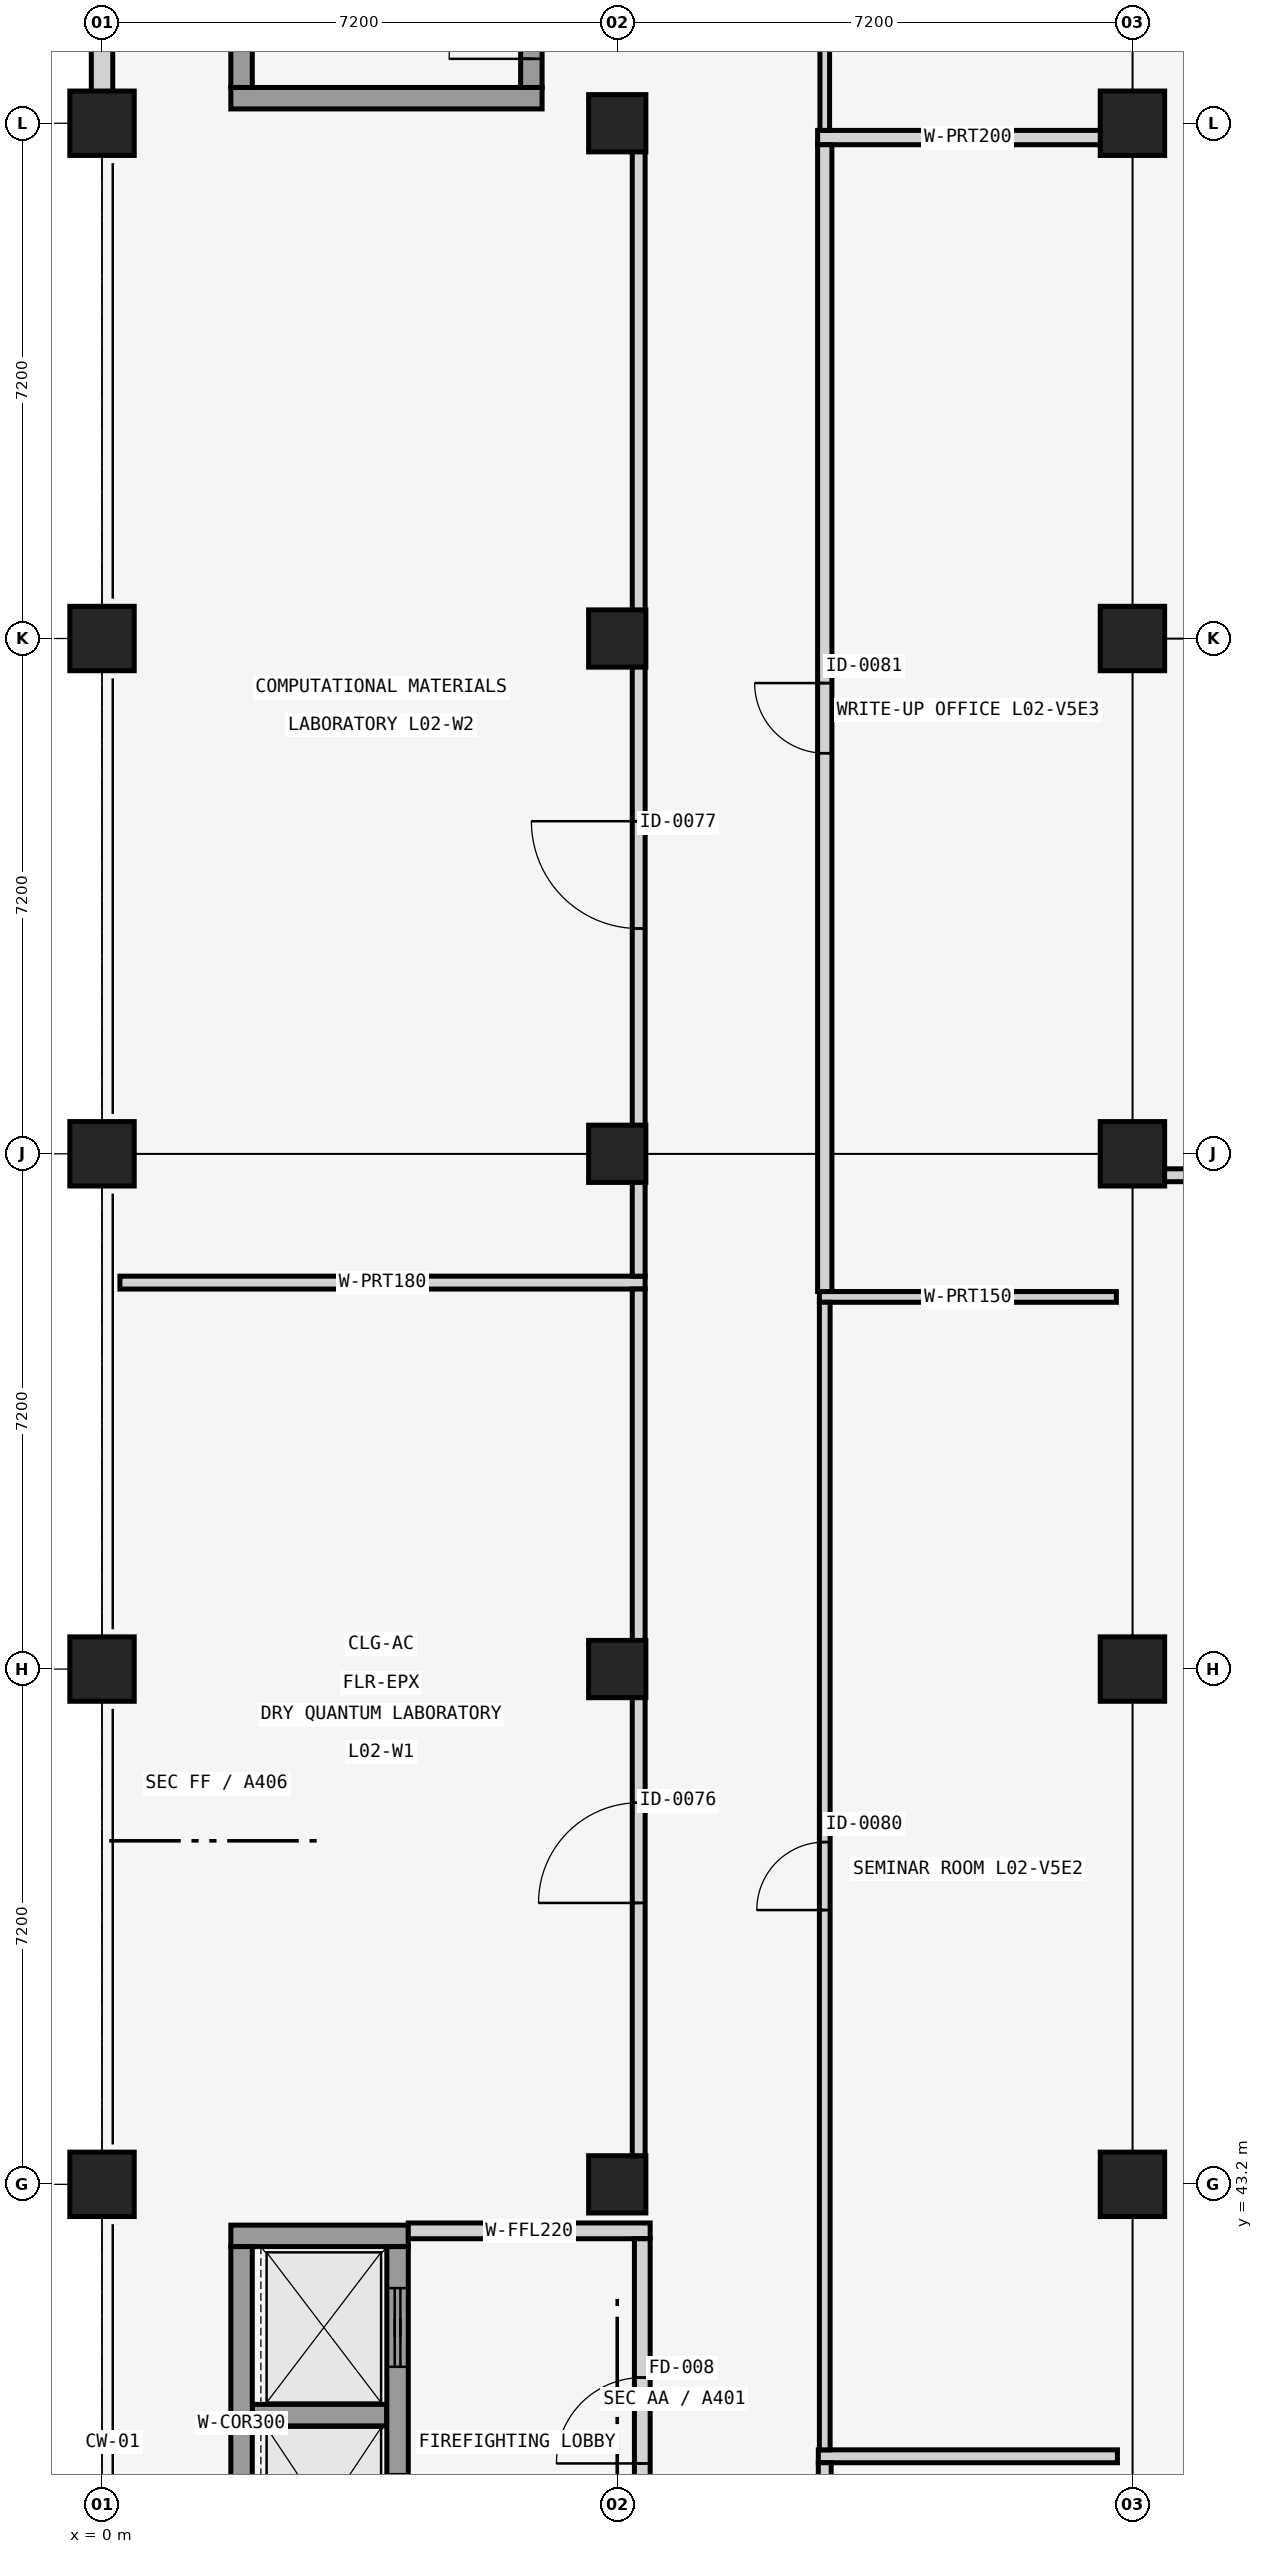
"""IFC4 building model, lengths in metres.
Left out: names, types, materials, properties, quantities, classifications, styles, units other than length and angle.
Written with IfcOpenShell. Run it as: python <this file> out.ifc"""

import sys

from ifc_helpers import new_model, si_unit, direction, frame, frame_2d, origin, origin_2d, place, context, subcontext, project, spatial, rectangle, extrude, element, fill, save


model = new_model("IFC4")
c1 = context("Model", 3, precision=1e-05, world=origin(), true_north=direction((0.0, 1.0)))
c2 = subcontext(c1, "Body", "Model", "MODEL_VIEW")
j1 = project(units=[si_unit("LENGTHUNIT", "METRE"), si_unit("PLANEANGLEUNIT", "RADIAN")], contexts=[c1])
p1 = place(None, origin())
s1 = spatial("IfcSite", under=j1, at=p1, CompositionType="ELEMENT")
p2 = place(p1, origin())
s2 = spatial("IfcBuilding", under=s1, at=p2, CompositionType="ELEMENT")
p3 = place(p2, frame((0.0, 0.0, 8.96)))
s3 = spatial("IfcBuildingStorey", under=s2, at=p3, CompositionType="ELEMENT", Elevation=8.96)
for number, where, z_axis, x_axis in (
    (1, (0.0, 43.2, 0.0), (0.0, 0.0, 1.0), (1.0, 0.0, 0.0)),
    (2, (0.0, 50.4, 0.0), (0.0, 0.0, 1.0), (1.0, 0.0, 0.0)),
    (3, (0.0, 57.6, 0.0), (0.0, 0.0, 1.0), (1.0, 0.0, 0.0)),
    (4, (0.0, 64.8, 0.0), (0.0, 0.0, 1.0), (1.0, 0.0, 0.0)),
    (5, (0.0, 72.0, 0.0), (0.0, 0.0, 1.0), (1.0, 0.0, 0.0)),
):
    element("IfcColumn", number, at=place(p3, frame(where, z_axis=z_axis, x_axis=x_axis)), inside=s3, PredefinedType="COLUMN", context=c2, shape_type="SweptSolid", body=[
        extrude(rectangle(XDim=0.9, YDim=0.9, at=origin_2d()), origin(), (0.0, 0.0, 1.0), 4.16),
    ])
for number, where, z_axis, x_axis in (
    (6, (7.2, 43.2, 0.0), (0.0, 0.0, 1.0), (1.0, 0.0, 0.0)),
    (7, (7.2, 50.4, 0.0), (0.0, 0.0, 1.0), (1.0, 0.0, 0.0)),
    (8, (7.2, 57.6, 0.0), (0.0, 0.0, 1.0), (1.0, 0.0, 0.0)),
    (9, (7.2, 64.8, 0.0), (0.0, 0.0, 1.0), (1.0, 0.0, 0.0)),
    (10, (7.2, 72.0, 0.0), (0.0, 0.0, 1.0), (1.0, 0.0, 0.0)),
):
    element("IfcColumn", number, at=place(p3, frame(where, z_axis=z_axis, x_axis=x_axis)), inside=s3, PredefinedType="COLUMN", context=c2, shape_type="SweptSolid", body=[
        extrude(rectangle(XDim=0.8, YDim=0.8, at=origin_2d()), origin(), (0.0, 0.0, 1.0), 4.16),
    ])
for number, where, z_axis, x_axis in (
    (11, (14.4, 43.2, 0.0), (0.0, 0.0, 1.0), (1.0, 0.0, 0.0)),
    (12, (14.4, 50.4, 0.0), (0.0, 0.0, 1.0), (1.0, 0.0, 0.0)),
    (13, (14.4, 57.6, 0.0), (0.0, 0.0, 1.0), (1.0, 0.0, 0.0)),
    (14, (14.4, 64.8, 0.0), (0.0, 0.0, 1.0), (1.0, 0.0, 0.0)),
    (15, (14.4, 72.0, 0.0), (0.0, 0.0, 1.0), (1.0, 0.0, 0.0)),
):
    element("IfcColumn", number, at=place(p3, frame(where, z_axis=z_axis, x_axis=x_axis)), inside=s3, PredefinedType="COLUMN", context=c2, shape_type="SweptSolid", body=[
        extrude(rectangle(XDim=0.9, YDim=0.9, at=origin_2d()), origin(), (0.0, 0.0, 1.0), 4.16),
    ])
p4 = place(p3, frame((0.0, 72.44, 0.0), z_axis=(0.0, 0.0, 1.0), x_axis=(0.0, 1.0, 0.0)))
e16 = element("IfcWall", 16, at=p4, inside=s3, PredefinedType="SOLIDWALL", context=c2, shape_type="SweptSolid", body=[
    extrude(rectangle(XDim=6.32, YDim=0.3, at=frame_2d((3.16, 0.0))), origin(), (0.0, 0.0, 1.0), 3.21),
])
p5 = place(p4, frame((2.935, 0.0, 0.65)))
e17 = element("IfcOpeningElement", 17, at=p5, cuts=e16, PredefinedType="OPENING", context=c2, shape_type="SweptSolid", body=[
    extrude(rectangle(XDim=0.45, YDim=2.4, at=frame_2d((0.225, 1.2))), frame((0.0, 0.16, 0.0), z_axis=(0.0, -1.0, 0.0), x_axis=(1.0, 0.0, 0.0)), (0.0, 0.0, 1.0), 0.32),
])
p6 = place(p3, frame((1.8, 42.48, 0.0), z_axis=(0.0, 0.0, 1.0), x_axis=(1.0, 0.0, 0.0)))
e18 = element("IfcWall", 18, at=p6, inside=s3, PredefinedType="SHEAR", context=c2, shape_type="SweptSolid", body=[
    extrude(rectangle(XDim=2.48, YDim=0.3, at=frame_2d((1.24, 0.0))), origin(), (0.0, 0.0, 1.0), 3.81),
])
p7 = place(p3, frame((2.1, 39.975, 0.0), z_axis=(0.0, 0.0, 1.0), x_axis=(1.0, 0.0, 0.0)))
e19 = element("IfcWall", 19, at=p7, inside=s3, PredefinedType="SHEAR", context=c2, shape_type="SweptSolid", body=[
    extrude(rectangle(XDim=1.88, YDim=0.3, at=frame_2d((0.94, 0.0))), origin(), (0.0, 0.0, 1.0), 3.81),
])
p8 = place(p3, frame((1.95, 37.4, 0.0), z_axis=(0.0, 0.0, 1.0), x_axis=(0.0, 1.0, 0.0)))
e20 = element("IfcWall", 20, at=p8, inside=s3, PredefinedType="SHEAR", context=c2, shape_type="SweptSolid", body=[
    extrude(rectangle(XDim=4.93, YDim=0.3, at=frame_2d((2.465, 0.0))), origin(), (0.0, 0.0, 1.0), 3.81),
])
p9 = place(p3, frame((4.13, 37.4, 0.0), z_axis=(0.0, 0.0, 1.0), x_axis=(0.0, 1.0, 0.0)))
e21 = element("IfcWall", 21, at=p9, inside=s3, PredefinedType="SHEAR", context=c2, shape_type="SweptSolid", body=[
    extrude(rectangle(XDim=4.93, YDim=0.3, at=frame_2d((2.465, 0.0))), origin(), (0.0, 0.0, 1.0), 3.81),
])
p10 = place(p9, frame((0.65, 0.0, 0.0)))
e22 = element("IfcOpeningElement", 22, at=p10, cuts=e21, PredefinedType="OPENING", context=c2, shape_type="SweptSolid", body=[
    extrude(rectangle(XDim=1.1, YDim=2.2, at=frame_2d((0.55, 1.1))), frame((0.0, 0.16, 0.0), z_axis=(0.0, -1.0, 0.0), x_axis=(1.0, 0.0, 0.0)), (0.0, 0.0, 1.0), 0.32),
])
p11 = place(p9, frame((3.25, 0.0, 0.0)))
e23 = element("IfcOpeningElement", 23, at=p11, cuts=e21, PredefinedType="OPENING", context=c2, shape_type="SweptSolid", body=[
    extrude(rectangle(XDim=1.1, YDim=2.2, at=frame_2d((0.55, 1.1))), frame((0.0, 0.16, 0.0), z_axis=(0.0, -1.0, 0.0), x_axis=(1.0, 0.0, 0.0)), (0.0, 0.0, 1.0), 0.32),
])
p12 = place(p3, frame((4.28, 42.55, 0.0), z_axis=(0.0, 0.0, 1.0), x_axis=(1.0, 0.0, 0.0)))
e24 = element("IfcWall", 24, at=p12, inside=s3, PredefinedType="SOLIDWALL", context=c2, shape_type="SweptSolid", body=[
    extrude(rectangle(XDim=3.38, YDim=0.22, at=frame_2d((1.69, 0.0))), origin(), (0.0, 0.0, 1.0), 2.81),
])
p13 = place(p3, frame((7.55, 37.36, 0.0), z_axis=(0.0, 0.0, 1.0), x_axis=(0.0, 1.0, 0.0)))
e25 = element("IfcWall", 25, at=p13, inside=s3, PredefinedType="SOLIDWALL", context=c2, shape_type="SweptSolid", body=[
    extrude(rectangle(XDim=5.08, YDim=0.22, at=frame_2d((2.54, 0.0))), origin(), (0.0, 0.0, 1.0), 3.51),
])
p14 = place(p13, frame((1.94, 0.0, 0.0)))
e26 = element("IfcOpeningElement", 26, at=p14, cuts=e25, PredefinedType="OPENING", context=c2, shape_type="SweptSolid", body=[
    extrude(rectangle(XDim=1.2, YDim=2.2, at=frame_2d((0.6, 1.1))), frame((0.0, 0.12, 0.0), z_axis=(0.0, -1.0, 0.0), x_axis=(1.0, 0.0, 0.0)), (0.0, 0.0, 1.0), 0.24),
])
p15 = place(p3, frame((1.8, 72.35, 0.0), z_axis=(0.0, 0.0, 1.0), x_axis=(1.0, 0.0, 0.0)))
e27 = element("IfcWall", 27, at=p15, inside=s3, PredefinedType="SHEAR", context=c2, shape_type="SweptSolid", body=[
    extrude(rectangle(XDim=4.35, YDim=0.3, at=frame_2d((2.175, 0.0))), origin(), (0.0, 0.0, 1.0), 3.81),
])
p16 = place(p3, frame((1.95, 72.5, 0.0), z_axis=(0.0, 0.0, 1.0), x_axis=(0.0, 1.0, 0.0)))
e28 = element("IfcWall", 28, at=p16, inside=s3, PredefinedType="SHEAR", context=c2, shape_type="SweptSolid", body=[
    extrude(rectangle(XDim=7.8, YDim=0.3, at=frame_2d((3.9, 0.0))), origin(), (0.0, 0.0, 1.0), 3.81),
])
p17 = place(p3, frame((6.0, 72.5, 0.0), z_axis=(0.0, 0.0, 1.0), x_axis=(0.0, 1.0, 0.0)))
e29 = element("IfcWall", 29, at=p17, inside=s3, PredefinedType="SHEAR", context=c2, shape_type="SweptSolid", body=[
    extrude(rectangle(XDim=7.8, YDim=0.3, at=frame_2d((3.9, 0.0))), origin(), (0.0, 0.0, 1.0), 3.81),
])
p18 = place(p17, frame((0.4, 0.0, 0.0)))
e30 = element("IfcOpeningElement", 30, at=p18, cuts=e29, PredefinedType="OPENING", context=c2, shape_type="SweptSolid", body=[
    extrude(rectangle(XDim=1.15, YDim=2.2, at=frame_2d((0.575, 1.1))), frame((0.0, 0.16, 0.0), z_axis=(0.0, -1.0, 0.0), x_axis=(1.0, 0.0, 0.0)), (0.0, 0.0, 1.0), 0.32),
])
p19 = place(p3, frame((0.25, 55.8, 0.0), z_axis=(0.0, 0.0, 1.0), x_axis=(1.0, 0.0, 0.0)))
e31 = element("IfcWall", 31, at=p19, inside=s3, PredefinedType="PARTITIONING", context=c2, shape_type="SweptSolid", body=[
    extrude(rectangle(XDim=7.34, YDim=0.18, at=frame_2d((3.67, 0.0))), origin(), (0.0, 0.0, 1.0), 2.81),
])
p20 = place(p3, frame((7.5, 43.59, 0.0), z_axis=(0.0, 0.0, 1.0), x_axis=(0.0, 1.0, 0.0)))
e32 = element("IfcWall", 32, at=p20, inside=s3, PredefinedType="PARTITIONING", context=c2, shape_type="SweptSolid", body=[
    extrude(rectangle(XDim=12.12, YDim=0.18, at=frame_2d((6.06, 0.0))), origin(), (0.0, 0.0, 1.0), 3.21),
])
p21 = place(p20, frame((3.542, 0.0, 0.0)))
e33 = element("IfcOpeningElement", 33, at=p21, cuts=e32, PredefinedType="OPENING", context=c2, shape_type="SweptSolid", body=[
    extrude(rectangle(XDim=1.4, YDim=2.2, at=frame_2d((0.7, 1.1))), frame((0.0, 0.1, 0.0), z_axis=(0.0, -1.0, 0.0), x_axis=(1.0, 0.0, 0.0)), (0.0, 0.0, 1.0), 0.2),
])
p22 = place(p3, frame((7.5, 55.89, 0.0), z_axis=(0.0, 0.0, 1.0), x_axis=(0.0, 1.0, 0.0)))
e34 = element("IfcWall", 34, at=p22, inside=s3, PredefinedType="PARTITIONING", context=c2, shape_type="SweptSolid", body=[
    extrude(rectangle(XDim=16.02, YDim=0.18, at=frame_2d((8.01, 0.0))), origin(), (0.0, 0.0, 1.0), 3.21),
])
p23 = place(p22, frame((4.857, 0.0, 0.0)))
e35 = element("IfcOpeningElement", 35, at=p23, cuts=e34, PredefinedType="OPENING", context=c2, shape_type="SweptSolid", body=[
    extrude(rectangle(XDim=1.5, YDim=2.2, at=frame_2d((0.75, 1.1))), frame((0.0, 0.1, 0.0), z_axis=(0.0, -1.0, 0.0), x_axis=(1.0, 0.0, 0.0)), (0.0, 0.0, 1.0), 0.2),
])
p24 = place(p3, frame((10.01, 39.4, 0.0), z_axis=(0.0, 0.0, 1.0), x_axis=(1.0, 0.0, 0.0)))
e36 = element("IfcWall", 36, at=p24, inside=s3, PredefinedType="PARTITIONING", context=c2, shape_type="SweptSolid", body=[
    extrude(rectangle(XDim=4.18, YDim=0.18, at=frame_2d((2.09, 0.0))), origin(), (0.0, 0.0, 1.0), 2.81),
])
p25 = place(p3, frame((10.1, 25.49, 0.0), z_axis=(0.0, 0.0, 1.0), x_axis=(0.0, 1.0, 0.0)))
e37 = element("IfcWall", 37, at=p25, inside=s3, PredefinedType="PARTITIONING", context=c2, shape_type="SweptSolid", body=[
    extrude(rectangle(XDim=13.82, YDim=0.18, at=frame_2d((6.91, 0.0))), origin(), (0.0, 0.0, 1.0), 3.21),
])
p26 = place(p25, frame((6.45, 0.0, 0.0)))
e38 = element("IfcOpeningElement", 38, at=p26, cuts=e37, PredefinedType="OPENING", context=c2, shape_type="SweptSolid", body=[
    extrude(rectangle(XDim=0.92, YDim=2.1, at=frame_2d((0.46, 1.05))), frame((0.0, 0.1, 0.0), z_axis=(0.0, -1.0, 0.0), x_axis=(1.0, 0.0, 0.0)), (0.0, 0.0, 1.0), 0.2),
])
p27 = place(p3, frame((10.025, 55.6, 0.0), z_axis=(0.0, 0.0, 1.0), x_axis=(1.0, 0.0, 0.0)))
e39 = element("IfcWall", 39, at=p27, inside=s3, PredefinedType="PARTITIONING", context=c2, shape_type="SweptSolid", body=[
    extrude(rectangle(XDim=4.15, YDim=0.15, at=frame_2d((2.075, 0.0))), origin(), (0.0, 0.0, 1.0), 2.81),
])
p28 = place(p3, frame((10.1, 39.49, 0.0), z_axis=(0.0, 0.0, 1.0), x_axis=(0.0, 1.0, 0.0)))
e40 = element("IfcWall", 40, at=p28, inside=s3, PredefinedType="PARTITIONING", context=c2, shape_type="SweptSolid", body=[
    extrude(rectangle(XDim=16.035, YDim=0.15, at=frame_2d((8.018, 0.0))), origin(), (0.0, 0.0, 1.0), 3.21),
])
p29 = place(p28, frame((7.542, 0.0, 0.0)))
e41 = element("IfcOpeningElement", 41, at=p29, cuts=e40, PredefinedType="OPENING", context=c2, shape_type="SweptSolid", body=[
    extrude(rectangle(XDim=0.95, YDim=2.1, at=frame_2d((0.475, 1.05))), frame((0.0, 0.085, 0.0), z_axis=(0.0, -1.0, 0.0), x_axis=(1.0, 0.0, 0.0)), (0.0, 0.0, 1.0), 0.17),
])
p30 = place(p3, frame((10.0, 71.8, 0.0), z_axis=(0.0, 0.0, 1.0), x_axis=(1.0, 0.0, 0.0)))
e42 = element("IfcWall", 42, at=p30, inside=s3, PredefinedType="PARTITIONING", context=c2, shape_type="SweptSolid", body=[
    extrude(rectangle(XDim=4.2, YDim=0.2, at=frame_2d((2.1, 0.0))), origin(), (0.0, 0.0, 1.0), 3.21),
])
p31 = place(p3, frame((10.1, 55.675, 0.0), z_axis=(0.0, 0.0, 1.0), x_axis=(0.0, 1.0, 0.0)))
e43 = element("IfcWall", 43, at=p31, inside=s3, PredefinedType="PARTITIONING", context=c2, shape_type="SweptSolid", body=[
    extrude(rectangle(XDim=16.025, YDim=0.2, at=frame_2d((8.012, 0.0))), origin(), (0.0, 0.0, 1.0), 3.21),
])
p32 = place(p31, frame((7.522, 0.0, 0.0)))
e44 = element("IfcOpeningElement", 44, at=p32, cuts=e43, PredefinedType="OPENING", context=c2, shape_type="SweptSolid", body=[
    extrude(rectangle(XDim=0.98, YDim=2.1, at=frame_2d((0.49, 1.05))), frame((0.0, 0.11, 0.0), z_axis=(0.0, -1.0, 0.0), x_axis=(1.0, 0.0, 0.0)), (0.0, 0.0, 1.0), 0.22),
])
p33 = place(p3, frame((10.1, 71.9, 0.0), z_axis=(0.0, 0.0, 1.0), x_axis=(0.0, 1.0, 0.0)))
e45 = element("IfcWall", 45, at=p33, inside=s3, PredefinedType="PARTITIONING", context=c2, shape_type="SweptSolid", body=[
    extrude(rectangle(XDim=14.125, YDim=0.135, at=frame_2d((7.062, 0.0))), origin(), (0.0, 0.0, 1.0), 3.21),
])
p34 = place(p33, frame((6.562, 0.0, 0.0)))
e46 = element("IfcOpeningElement", 46, at=p34, cuts=e45, PredefinedType="OPENING", context=c2, shape_type="SweptSolid", body=[
    extrude(rectangle(XDim=1.0, YDim=2.1, at=frame_2d((0.5, 1.05))), frame((0.0, 0.078, 0.0), z_axis=(0.0, -1.0, 0.0), x_axis=(1.0, 0.0, 0.0)), (0.0, 0.0, 1.0), 0.155),
])
p35 = place(p3, frame((14.51, 57.3, 0.0), z_axis=(0.0, 0.0, 1.0), x_axis=(1.0, 0.0, 0.0)))
e47 = element("IfcWall", 47, at=p35, inside=s3, PredefinedType="PARTITIONING", context=c2, shape_type="SweptSolid", body=[
    extrude(rectangle(XDim=21.58, YDim=0.18, at=frame_2d((10.79, 0.0))), origin(), (0.0, 0.0, 1.0), 2.81),
])
p36 = place(p35, frame((10.14, 0.0, 0.0)))
e48 = element("IfcOpeningElement", 48, at=p36, cuts=e47, PredefinedType="OPENING", context=c2, shape_type="SweptSolid", body=[
    extrude(rectangle(XDim=1.3, YDim=2.15, at=frame_2d((0.65, 1.075))), frame((0.0, 0.1, 0.0), z_axis=(0.0, -1.0, 0.0), x_axis=(1.0, 0.0, 0.0)), (0.0, 0.0, 1.0), 0.2),
])
p37 = place(p11, origin())
e49 = element("IfcDoor", 49, at=p37, inside=s3, OperationType="SLIDING_TO_LEFT", PredefinedType="DOOR", context=c2, shape_type="SweptSolid", body=[
    extrude(rectangle(XDim=1.1, YDim=2.2, at=frame_2d((0.55, 1.1))), frame((0.0, 0.025, 0.0), z_axis=(0.0, -1.0, 0.0), x_axis=(1.0, 0.0, 0.0)), (0.0, 0.0, 1.0), 0.05),
])
fill(e23, e49)
p38 = place(p14, origin())
e50 = element("IfcDoor", 50, at=p38, inside=s3, OperationType="SINGLE_SWING_LEFT", PredefinedType="DOOR", context=c2, shape_type="SweptSolid", body=[
    extrude(rectangle(XDim=1.2, YDim=2.2, at=frame_2d((0.6, 1.1))), frame((0.0, 0.025, 0.0), z_axis=(0.0, -1.0, 0.0), x_axis=(1.0, 0.0, 0.0)), (0.0, 0.0, 1.0), 0.05),
])
fill(e26, e50)
p39 = place(p18, origin())
e51 = element("IfcDoor", 51, at=p39, inside=s3, OperationType="SINGLE_SWING_LEFT", PredefinedType="DOOR", context=c2, shape_type="SweptSolid", body=[
    extrude(rectangle(XDim=1.15, YDim=2.2, at=frame_2d((0.575, 1.1))), frame((0.0, 0.025, 0.0), z_axis=(0.0, -1.0, 0.0), x_axis=(1.0, 0.0, 0.0)), (0.0, 0.0, 1.0), 0.05),
])
fill(e30, e51)
p40 = place(p21, origin())
e52 = element("IfcDoor", 52, at=p40, inside=s3, OperationType="SINGLE_SWING_LEFT", PredefinedType="DOOR", context=c2, shape_type="SweptSolid", body=[
    extrude(rectangle(XDim=1.4, YDim=2.2, at=frame_2d((0.7, 1.1))), frame((0.0, 0.025, 0.0), z_axis=(0.0, -1.0, 0.0), x_axis=(1.0, 0.0, 0.0)), (0.0, 0.0, 1.0), 0.05),
])
fill(e33, e52)
p41 = place(p23, origin())
e53 = element("IfcDoor", 53, at=p41, inside=s3, OperationType="SINGLE_SWING_RIGHT", PredefinedType="DOOR", context=c2, shape_type="SweptSolid", body=[
    extrude(rectangle(XDim=1.5, YDim=2.2, at=frame_2d((0.75, 1.1))), frame((0.0, 0.025, 0.0), z_axis=(0.0, -1.0, 0.0), x_axis=(1.0, 0.0, 0.0)), (0.0, 0.0, 1.0), 0.05),
])
fill(e35, e53)
p42 = place(p29, origin())
e54 = element("IfcDoor", 54, at=p42, inside=s3, OperationType="SINGLE_SWING_LEFT", PredefinedType="DOOR", context=c2, shape_type="SweptSolid", body=[
    extrude(rectangle(XDim=0.95, YDim=2.1, at=frame_2d((0.475, 1.05))), frame((0.0, 0.025, 0.0), z_axis=(0.0, -1.0, 0.0), x_axis=(1.0, 0.0, 0.0)), (0.0, 0.0, 1.0), 0.05),
])
fill(e41, e54)
p43 = place(p32, origin())
e55 = element("IfcDoor", 55, at=p43, inside=s3, OperationType="SINGLE_SWING_RIGHT", PredefinedType="DOOR", context=c2, shape_type="SweptSolid", body=[
    extrude(rectangle(XDim=0.98, YDim=2.1, at=frame_2d((0.49, 1.05))), frame((0.0, 0.025, 0.0), z_axis=(0.0, -1.0, 0.0), x_axis=(1.0, 0.0, 0.0)), (0.0, 0.0, 1.0), 0.05),
])
fill(e44, e55)
save(model, sys.argv[1])
